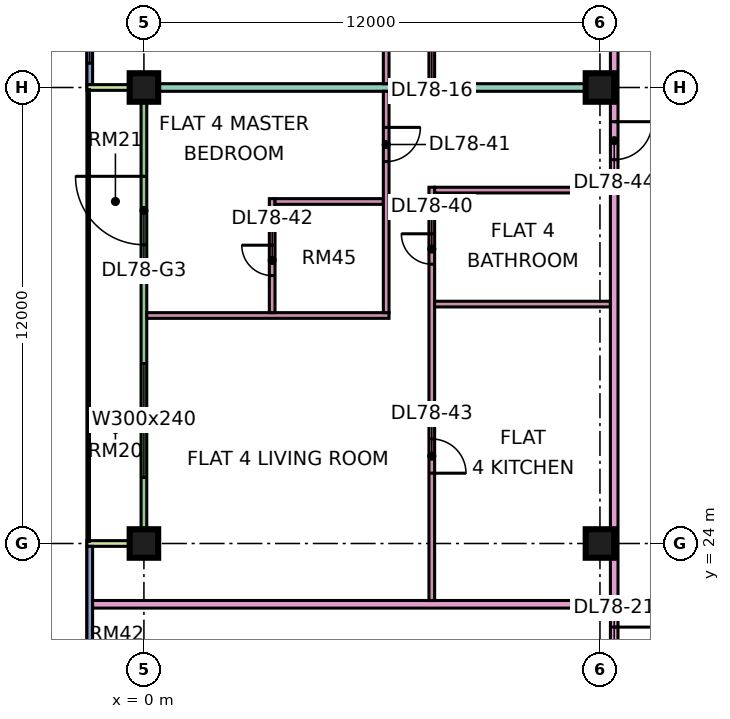
"""IFC4 building model, lengths in metres.
Left out: names, types, materials, properties, quantities, classifications, styles, units other than length and angle.
Written with IfcOpenShell. Run it as: python <this file> out.ifc"""

import sys

from ifc_helpers import new_model, si_unit, direction, frame, frame_2d, origin, origin_2d, place, context, subcontext, project, spatial, rectangle, extrude, element, fill, save


model = new_model("IFC4")
c1 = context("Model", 3, precision=1e-05, world=origin(), true_north=direction((0.0, 1.0)))
c2 = subcontext(c1, "Body", "Model", "MODEL_VIEW")
j1 = project(units=[si_unit("LENGTHUNIT", "METRE"), si_unit("PLANEANGLEUNIT", "RADIAN")], contexts=[c1])
p1 = place(None, origin())
s1 = spatial("IfcSite", under=j1, at=p1, CompositionType="ELEMENT")
p2 = place(p1, origin())
s2 = spatial("IfcBuilding", under=s1, at=p2, CompositionType="ELEMENT")
p3 = place(p2, frame((0.0, 0.0, 338.9)))
s3 = spatial("IfcBuildingStorey", under=s2, at=p3, CompositionType="ELEMENT", Elevation=338.9)
p4 = place(p3, frame((0.0, 24.0, 0.0), z_axis=(0.0, 0.0, 1.0), x_axis=(1.0, 0.0, 0.0)))
e1 = element("IfcColumn", 1, at=p4, inside=s3, PredefinedType="COLUMN", context=c2, shape_type="SweptSolid", body=[
    extrude(rectangle(XDim=0.75, YDim=0.75, at=origin_2d()), origin(), (0.0, 0.0, 1.0), 3.75),
])
p5 = place(p3, frame((0.0, 36.0, 0.0), z_axis=(0.0, 0.0, 1.0), x_axis=(1.0, 0.0, 0.0)))
e2 = element("IfcColumn", 2, at=p5, inside=s3, PredefinedType="COLUMN", context=c2, shape_type="SweptSolid", body=[
    extrude(rectangle(XDim=0.75, YDim=0.75, at=origin_2d()), origin(), (0.0, 0.0, 1.0), 3.75),
])
for number, where, z_axis, x_axis in (
    (3, (12.0, 24.0, 0.0), (0.0, 0.0, 1.0), (1.0, 0.0, 0.0)),
    (4, (12.0, 36.0, 0.0), (0.0, 0.0, 1.0), (1.0, 0.0, 0.0)),
):
    element("IfcColumn", number, at=place(p3, frame(where, z_axis=z_axis, x_axis=x_axis)), inside=s3, PredefinedType="COLUMN", context=c2, shape_type="SweptSolid", body=[
        extrude(rectangle(XDim=0.75, YDim=0.75, at=origin_2d()), origin(), (0.0, 0.0, 1.0), 3.75),
    ])
p6 = place(p3, frame((-1.425, 47.925, 0.0), z_axis=(0.0, 0.0, 1.0), x_axis=(0.0, -1.0, 0.0)))
e5 = element("IfcWall", 5, at=p6, inside=s3, PredefinedType="SOLIDWALL", context=c2, shape_type="SweptSolid", body=[
    extrude(rectangle(XDim=11.85, YDim=0.15, at=frame_2d((5.925, 0.0))), origin(), (0.0, 0.0, 1.0), 3.35),
])
p7 = place(p6, frame((0.562, 0.0, 0.45)))
e6 = element("IfcOpeningElement", 6, at=p7, cuts=e5, PredefinedType="OPENING", context=c2, shape_type="SweptSolid", body=[
    extrude(rectangle(XDim=1.8, YDim=2.4, at=frame_2d((0.9, 1.2))), frame((0.0, 0.085, 0.0), z_axis=(0.0, -1.0, 0.0), x_axis=(1.0, 0.0, 0.0)), (0.0, 0.0, 1.0), 0.17),
])
p8 = place(p6, frame((3.525, 0.0, 0.45)))
e7 = element("IfcOpeningElement", 7, at=p8, cuts=e5, PredefinedType="OPENING", context=c2, shape_type="SweptSolid", body=[
    extrude(rectangle(XDim=1.8, YDim=2.4, at=frame_2d((0.9, 1.2))), frame((0.0, 0.085, 0.0), z_axis=(0.0, -1.0, 0.0), x_axis=(1.0, 0.0, 0.0)), (0.0, 0.0, 1.0), 0.17),
])
p9 = place(p6, frame((6.525, 0.0, 0.45)))
e8 = element("IfcOpeningElement", 8, at=p9, cuts=e5, PredefinedType="OPENING", context=c2, shape_type="SweptSolid", body=[
    extrude(rectangle(XDim=1.8, YDim=2.4, at=frame_2d((0.9, 1.2))), frame((0.0, 0.085, 0.0), z_axis=(0.0, -1.0, 0.0), x_axis=(1.0, 0.0, 0.0)), (0.0, 0.0, 1.0), 0.17),
])
p10 = place(p6, frame((9.488, 0.0, 0.45)))
e9 = element("IfcOpeningElement", 9, at=p10, cuts=e5, PredefinedType="OPENING", context=c2, shape_type="SweptSolid", body=[
    extrude(rectangle(XDim=1.8, YDim=2.4, at=frame_2d((0.9, 1.2))), frame((0.0, 0.085, 0.0), z_axis=(0.0, -1.0, 0.0), x_axis=(1.0, 0.0, 0.0)), (0.0, 0.0, 1.0), 0.17),
])
p11 = place(p3, frame((0.0, 35.925, 0.0), z_axis=(0.0, 0.0, 1.0), x_axis=(0.0, -1.0, 0.0)))
e10 = element("IfcWall", 10, at=p11, inside=s3, PredefinedType="SOLIDWALL", context=c2, shape_type="SweptSolid", body=[
    extrude(rectangle(XDim=11.85, YDim=0.15, at=frame_2d((5.925, 0.0))), origin(), (0.0, 0.0, 1.0), 3.35),
])
p12 = place(p11, frame((2.262, 0.0, 0.0)))
e11 = element("IfcOpeningElement", 11, at=p12, cuts=e10, PredefinedType="OPENING", context=c2, shape_type="SweptSolid", body=[
    extrude(rectangle(XDim=1.8, YDim=2.4, at=frame_2d((0.9, 1.2))), frame((0.0, 0.085, 0.0), z_axis=(0.0, -1.0, 0.0), x_axis=(1.0, 0.0, 0.0)), (0.0, 0.0, 1.0), 0.17),
])
p13 = place(p11, frame((7.188, 0.0, 0.45)))
e12 = element("IfcOpeningElement", 12, at=p13, cuts=e10, PredefinedType="OPENING", context=c2, shape_type="SweptSolid", body=[
    extrude(rectangle(XDim=3.0, YDim=2.4, at=frame_2d((1.5, 1.2))), frame((0.0, 0.085, 0.0), z_axis=(0.0, -1.0, 0.0), x_axis=(1.0, 0.0, 0.0)), (0.0, 0.0, 1.0), 0.17),
])
for number, where, z_axis, x_axis in (
    (13, (-1.5, 36.0, 0.0), (0.0, 0.0, 1.0), (1.0, 0.0, 0.0)),
    (14, (-1.5, 24.0, 0.0), (0.0, 0.0, 1.0), (1.0, 0.0, 0.0)),
):
    element("IfcWall", number, at=place(p3, frame(where, z_axis=z_axis, x_axis=x_axis)), inside=s3, PredefinedType="SOLIDWALL", context=c2, shape_type="SweptSolid", body=[
        extrude(rectangle(XDim=1.5, YDim=0.15, at=frame_2d((0.75, 0.0))), origin(), (0.0, 0.0, 1.0), 3.35),
    ])
p14 = place(p3, frame((-1.425, 23.925, 0.0), z_axis=(0.0, 0.0, 1.0), x_axis=(0.0, -1.0, 0.0)))
e15 = element("IfcWall", 15, at=p14, inside=s3, PredefinedType="SOLIDWALL", context=c2, shape_type="SweptSolid", body=[
    extrude(rectangle(XDim=11.425, YDim=0.15, at=frame_2d((5.712, 0.0))), origin(), (0.0, 0.0, 1.0), 3.35),
])
p15 = place(p14, frame((6.175, 0.0, 0.45)))
e16 = element("IfcOpeningElement", 16, at=p15, cuts=e15, PredefinedType="OPENING", context=c2, shape_type="SweptSolid", body=[
    extrude(rectangle(XDim=3.0, YDim=2.4, at=frame_2d((1.5, 1.2))), frame((0.0, 0.085, 0.0), z_axis=(0.0, -1.0, 0.0), x_axis=(1.0, 0.0, 0.0)), (0.0, 0.0, 1.0), 0.17),
])
p16 = place(p3, frame((-1.35, 22.4, 0.0), z_axis=(0.0, 0.0, 1.0), x_axis=(1.0, 0.0, 0.0)))
e17 = element("IfcWall", 17, at=p16, inside=s3, PredefinedType="PARTITIONING", context=c2, shape_type="SweptSolid", body=[
    extrude(rectangle(XDim=13.625, YDim=0.2, at=frame_2d((6.812, 0.0))), origin(), (0.0, 0.0, 1.0), 3.35),
])
e18 = element("IfcWall", 18, at=p5, inside=s3, PredefinedType="PARTITIONING", context=c2, shape_type="SweptSolid", body=[
    extrude(rectangle(XDim=12.275, YDim=0.2, at=frame_2d((6.137, 0.0))), origin(), (0.0, 0.0, 1.0), 3.35),
])
p17 = place(p3, frame((0.074, 30.0, 0.0), z_axis=(0.0, 0.0, 1.0), x_axis=(1.0, 0.0, 0.0)))
e19 = element("IfcWall", 19, at=p17, inside=s3, PredefinedType="PARTITIONING", context=c2, shape_type="SweptSolid", body=[
    extrude(rectangle(XDim=6.376, YDim=0.15, at=frame_2d((3.188, 0.0))), origin(), (0.0, 0.0, 1.0), 3.35),
])
p18 = place(p3, frame((3.375, 30.075, 0.0), z_axis=(0.0, 0.0, 1.0), x_axis=(0.0, 1.0, 0.0)))
e20 = element("IfcWall", 20, at=p18, inside=s3, PredefinedType="PARTITIONING", context=c2, shape_type="SweptSolid", body=[
    extrude(rectangle(XDim=3.0, YDim=0.15, at=frame_2d((1.5, 0.0))), origin(), (0.0, 0.0, 1.0), 3.35),
])
p19 = place(p18, frame((0.975, 0.0, 0.0)))
e21 = element("IfcOpeningElement", 21, at=p19, cuts=e20, PredefinedType="OPENING", context=c2, shape_type="SweptSolid", body=[
    extrude(rectangle(XDim=0.8, YDim=2.1, at=frame_2d((0.4, 1.05))), frame((0.0, 0.085, 0.0), z_axis=(0.0, -1.0, 0.0), x_axis=(1.0, 0.0, 0.0)), (0.0, 0.0, 1.0), 0.17),
])
p20 = place(p3, frame((3.45, 33.0, 0.0), z_axis=(0.0, 0.0, 1.0), x_axis=(1.0, 0.0, 0.0)))
e22 = element("IfcWall", 22, at=p20, inside=s3, PredefinedType="PARTITIONING", context=c2, shape_type="SweptSolid", body=[
    extrude(rectangle(XDim=2.85, YDim=0.15, at=frame_2d((1.425, 0.0))), origin(), (0.0, 0.0, 1.0), 3.35),
])
p21 = place(p3, frame((6.375, 30.075, 0.0), z_axis=(0.0, 0.0, 1.0), x_axis=(0.0, 1.0, 0.0)))
e23 = element("IfcWall", 23, at=p21, inside=s3, PredefinedType="PARTITIONING", context=c2, shape_type="SweptSolid", body=[
    extrude(rectangle(XDim=5.825, YDim=0.15, at=frame_2d((2.913, 0.0))), origin(), (0.0, 0.0, 1.0), 3.35),
])
p22 = place(p21, frame((3.975, 0.0, 0.0)))
e24 = element("IfcOpeningElement", 24, at=p22, cuts=e23, PredefinedType="OPENING", context=c2, shape_type="SweptSolid", body=[
    extrude(rectangle(XDim=0.9, YDim=2.1, at=frame_2d((0.45, 1.05))), frame((0.0, 0.085, 0.0), z_axis=(0.0, -1.0, 0.0), x_axis=(1.0, 0.0, 0.0)), (0.0, 0.0, 1.0), 0.17),
])
p23 = place(p3, frame((6.375, 36.1, 0.0), z_axis=(0.0, 0.0, 1.0), x_axis=(0.0, 1.0, 0.0)))
e25 = element("IfcWall", 25, at=p23, inside=s3, PredefinedType="PARTITIONING", context=c2, shape_type="SweptSolid", body=[
    extrude(rectangle(XDim=2.95, YDim=0.15, at=frame_2d((1.475, 0.0))), origin(), (0.0, 0.0, 1.0), 3.35),
])
p24 = place(p23, frame((0.95, 0.0, 0.0)))
e26 = element("IfcOpeningElement", 26, at=p24, cuts=e25, PredefinedType="OPENING", context=c2, shape_type="SweptSolid", body=[
    extrude(rectangle(XDim=0.9, YDim=2.1, at=frame_2d((0.45, 1.05))), frame((0.0, 0.085, 0.0), z_axis=(0.0, -1.0, 0.0), x_axis=(1.0, 0.0, 0.0)), (0.0, 0.0, 1.0), 0.17),
])
p25 = place(p3, frame((7.575, 22.5, 0.0), z_axis=(0.0, 0.0, 1.0), x_axis=(0.0, 1.0, 0.0)))
e27 = element("IfcWall", 27, at=p25, inside=s3, PredefinedType="PARTITIONING", context=c2, shape_type="SweptSolid", body=[
    extrude(rectangle(XDim=10.875, YDim=0.15, at=frame_2d((5.438, 0.0))), origin(), (0.0, 0.0, 1.0), 3.35),
])
p26 = place(p25, frame((8.85, 0.0, 0.0)))
e28 = element("IfcOpeningElement", 28, at=p26, cuts=e27, PredefinedType="OPENING", context=c2, shape_type="SweptSolid", body=[
    extrude(rectangle(XDim=0.8, YDim=2.1, at=frame_2d((0.4, 1.05))), frame((0.0, 0.085, 0.0), z_axis=(0.0, -1.0, 0.0), x_axis=(1.0, 0.0, 0.0)), (0.0, 0.0, 1.0), 0.17),
])
p27 = place(p25, frame((3.35, 0.0, 0.0)))
e29 = element("IfcOpeningElement", 29, at=p27, cuts=e27, PredefinedType="OPENING", context=c2, shape_type="SweptSolid", body=[
    extrude(rectangle(XDim=0.9, YDim=2.1, at=frame_2d((0.45, 1.05))), frame((0.0, 0.085, 0.0), z_axis=(0.0, -1.0, 0.0), x_axis=(1.0, 0.0, 0.0)), (0.0, 0.0, 1.0), 0.17),
])
p28 = place(p3, frame((7.575, 36.1, 0.0), z_axis=(0.0, 0.0, 1.0), x_axis=(0.0, 1.0, 0.0)))
e30 = element("IfcWall", 30, at=p28, inside=s3, PredefinedType="PARTITIONING", context=c2, shape_type="SweptSolid", body=[
    extrude(rectangle(XDim=14.65, YDim=0.15, at=frame_2d((7.325, 0.0))), origin(), (0.0, 0.0, 1.0), 3.35),
])
p29 = place(p28, frame((4.25, 0.0, 0.0)))
e31 = element("IfcOpeningElement", 31, at=p29, cuts=e30, PredefinedType="OPENING", context=c2, shape_type="SweptSolid", body=[
    extrude(rectangle(XDim=0.8, YDim=2.1, at=frame_2d((0.4, 1.05))), frame((0.0, 0.085, 0.0), z_axis=(0.0, -1.0, 0.0), x_axis=(1.0, 0.0, 0.0)), (0.0, 0.0, 1.0), 0.17),
])
p30 = place(p28, frame((0.95, 0.0, 0.0)))
e32 = element("IfcOpeningElement", 32, at=p30, cuts=e30, PredefinedType="OPENING", context=c2, shape_type="SweptSolid", body=[
    extrude(rectangle(XDim=0.9, YDim=2.1, at=frame_2d((0.45, 1.05))), frame((0.0, 0.085, 0.0), z_axis=(0.0, -1.0, 0.0), x_axis=(1.0, 0.0, 0.0)), (0.0, 0.0, 1.0), 0.17),
])
p31 = place(p28, frame((7.25, 0.0, 0.0)))
e33 = element("IfcOpeningElement", 33, at=p31, cuts=e30, PredefinedType="OPENING", context=c2, shape_type="SweptSolid", body=[
    extrude(rectangle(XDim=0.8, YDim=2.1, at=frame_2d((0.4, 1.05))), frame((0.0, 0.085, 0.0), z_axis=(0.0, -1.0, 0.0), x_axis=(1.0, 0.0, 0.0)), (0.0, 0.0, 1.0), 0.17),
])
for number, where, z_axis, x_axis in (
    (34, (7.65, 30.3, 0.0), (0.0, 0.0, 1.0), (1.0, 0.0, 0.0)),
    (35, (7.65, 33.3, 0.0), (0.0, 0.0, 1.0), (1.0, 0.0, 0.0)),
):
    element("IfcWall", number, at=place(p3, frame(where, z_axis=z_axis, x_axis=x_axis)), inside=s3, PredefinedType="PARTITIONING", context=c2, shape_type="SweptSolid", body=[
        extrude(rectangle(XDim=4.625, YDim=0.15, at=frame_2d((2.312, 0.0))), origin(), (0.0, 0.0, 1.0), 3.35),
    ])
p32 = place(p3, frame((12.375, 20.0, 0.0), z_axis=(0.0, 0.0, 1.0), x_axis=(0.0, 1.0, 0.0)))
e36 = element("IfcWall", 36, at=p32, inside=s3, PredefinedType="PARTITIONING", context=c2, shape_type="SweptSolid", body=[
    extrude(rectangle(XDim=34.0, YDim=0.2, at=frame_2d((17.0, 0.0))), origin(), (0.0, 0.0, 1.0), 3.35),
])
p33 = place(p32, frame((31.8, 0.0, 0.0)))
e37 = element("IfcOpeningElement", 37, at=p33, cuts=e36, PredefinedType="OPENING", context=c2, shape_type="SweptSolid", body=[
    extrude(rectangle(XDim=1.0, YDim=2.1, at=frame_2d((0.5, 1.05))), frame((0.0, 0.11, 0.0), z_axis=(0.0, -1.0, 0.0), x_axis=(1.0, 0.0, 0.0)), (0.0, 0.0, 1.0), 0.22),
])
p34 = place(p32, frame((0.6, 0.0, 0.0)))
e38 = element("IfcOpeningElement", 38, at=p34, cuts=e36, PredefinedType="OPENING", context=c2, shape_type="SweptSolid", body=[
    extrude(rectangle(XDim=1.2, YDim=2.1, at=frame_2d((0.6, 1.05))), frame((0.0, 0.11, 0.0), z_axis=(0.0, -1.0, 0.0), x_axis=(1.0, 0.0, 0.0)), (0.0, 0.0, 1.0), 0.22),
])
p35 = place(p32, frame((14.1, 0.0, 0.0)))
e39 = element("IfcOpeningElement", 39, at=p35, cuts=e36, PredefinedType="OPENING", context=c2, shape_type="SweptSolid", body=[
    extrude(rectangle(XDim=1.0, YDim=2.1, at=frame_2d((0.5, 1.05))), frame((0.0, 0.11, 0.0), z_axis=(0.0, -1.0, 0.0), x_axis=(1.0, 0.0, 0.0)), (0.0, 0.0, 1.0), 0.22),
])
p36 = place(p10, origin())
e40 = element("IfcWindow", 40, at=p36, inside=s3, PartitioningType="SINGLE_PANEL", PredefinedType="WINDOW", context=c2, shape_type="SweptSolid", body=[
    extrude(rectangle(XDim=1.8, YDim=2.4, at=frame_2d((0.9, 1.2))), frame((0.0, 0.03, 0.0), z_axis=(0.0, -1.0, 0.0), x_axis=(1.0, 0.0, 0.0)), (0.0, 0.0, 1.0), 0.06),
])
fill(e9, e40)
p37 = place(p12, frame((1.8, 0.0, 0.0), z_axis=(0.0, 0.0, 1.0), x_axis=(-1.0, 0.0, 0.0)))
e41 = element("IfcDoor", 41, at=p37, inside=s3, OperationType="DOUBLE_DOOR_SINGLE_SWING", PredefinedType="DOOR", context=c2, shape_type="SweptSolid", body=[
    extrude(rectangle(XDim=1.8, YDim=2.4, at=frame_2d((0.9, 1.2))), frame((0.0, 0.025, 0.0), z_axis=(0.0, -1.0, 0.0), x_axis=(1.0, 0.0, 0.0)), (0.0, 0.0, 1.0), 0.05),
])
fill(e11, e41)
p38 = place(p13, origin())
e42 = element("IfcWindow", 42, at=p38, inside=s3, PartitioningType="SINGLE_PANEL", PredefinedType="WINDOW", context=c2, shape_type="SweptSolid", body=[
    extrude(rectangle(XDim=3.0, YDim=2.4, at=frame_2d((1.5, 1.2))), frame((0.0, 0.03, 0.0), z_axis=(0.0, -1.0, 0.0), x_axis=(1.0, 0.0, 0.0)), (0.0, 0.0, 1.0), 0.06),
])
fill(e12, e42)
p39 = place(p34, origin())
e43 = element("IfcDoor", 43, at=p39, inside=s3, OperationType="SINGLE_SWING_RIGHT", PredefinedType="DOOR", context=c2, shape_type="SweptSolid", body=[
    extrude(rectangle(XDim=1.2, YDim=2.1, at=frame_2d((0.6, 1.05))), frame((0.0, 0.025, 0.0), z_axis=(0.0, -1.0, 0.0), x_axis=(1.0, 0.0, 0.0)), (0.0, 0.0, 1.0), 0.05),
])
fill(e38, e43)
p40 = place(p26, frame((0.8, 0.0, 0.0), z_axis=(0.0, 0.0, 1.0), x_axis=(-1.0, 0.0, 0.0)))
e44 = element("IfcDoor", 44, at=p40, inside=s3, OperationType="SINGLE_SWING_RIGHT", PredefinedType="DOOR", context=c2, shape_type="SweptSolid", body=[
    extrude(rectangle(XDim=0.8, YDim=2.1, at=frame_2d((0.4, 1.05))), frame((0.0, 0.025, 0.0), z_axis=(0.0, -1.0, 0.0), x_axis=(1.0, 0.0, 0.0)), (0.0, 0.0, 1.0), 0.05),
])
fill(e28, e44)
p41 = place(p22, origin())
e45 = element("IfcDoor", 45, at=p41, inside=s3, OperationType="SINGLE_SWING_RIGHT", PredefinedType="DOOR", context=c2, shape_type="SweptSolid", body=[
    extrude(rectangle(XDim=0.9, YDim=2.1, at=frame_2d((0.45, 1.05))), frame((0.0, 0.025, 0.0), z_axis=(0.0, -1.0, 0.0), x_axis=(1.0, 0.0, 0.0)), (0.0, 0.0, 1.0), 0.05),
])
fill(e24, e45)
p42 = place(p19, frame((0.8, 0.0, 0.0), z_axis=(0.0, 0.0, 1.0), x_axis=(-1.0, 0.0, 0.0)))
e46 = element("IfcDoor", 46, at=p42, inside=s3, OperationType="SINGLE_SWING_RIGHT", PredefinedType="DOOR", context=c2, shape_type="SweptSolid", body=[
    extrude(rectangle(XDim=0.8, YDim=2.1, at=frame_2d((0.4, 1.05))), frame((0.0, 0.025, 0.0), z_axis=(0.0, -1.0, 0.0), x_axis=(1.0, 0.0, 0.0)), (0.0, 0.0, 1.0), 0.05),
])
fill(e21, e46)
p43 = place(p27, frame((0.9, 0.0, 0.0), z_axis=(0.0, 0.0, 1.0), x_axis=(-1.0, 0.0, 0.0)))
e47 = element("IfcDoor", 47, at=p43, inside=s3, OperationType="SINGLE_SWING_LEFT", PredefinedType="DOOR", context=c2, shape_type="SweptSolid", body=[
    extrude(rectangle(XDim=0.9, YDim=2.1, at=frame_2d((0.45, 1.05))), frame((0.0, 0.025, 0.0), z_axis=(0.0, -1.0, 0.0), x_axis=(1.0, 0.0, 0.0)), (0.0, 0.0, 1.0), 0.05),
])
fill(e29, e47)
p44 = place(p35, origin())
e48 = element("IfcDoor", 48, at=p44, inside=s3, OperationType="SINGLE_SWING_RIGHT", PredefinedType="DOOR", context=c2, shape_type="SweptSolid", body=[
    extrude(rectangle(XDim=1.0, YDim=2.1, at=frame_2d((0.5, 1.05))), frame((0.0, 0.025, 0.0), z_axis=(0.0, -1.0, 0.0), x_axis=(1.0, 0.0, 0.0)), (0.0, 0.0, 1.0), 0.05),
])
fill(e39, e48)
save(model, sys.argv[1])
